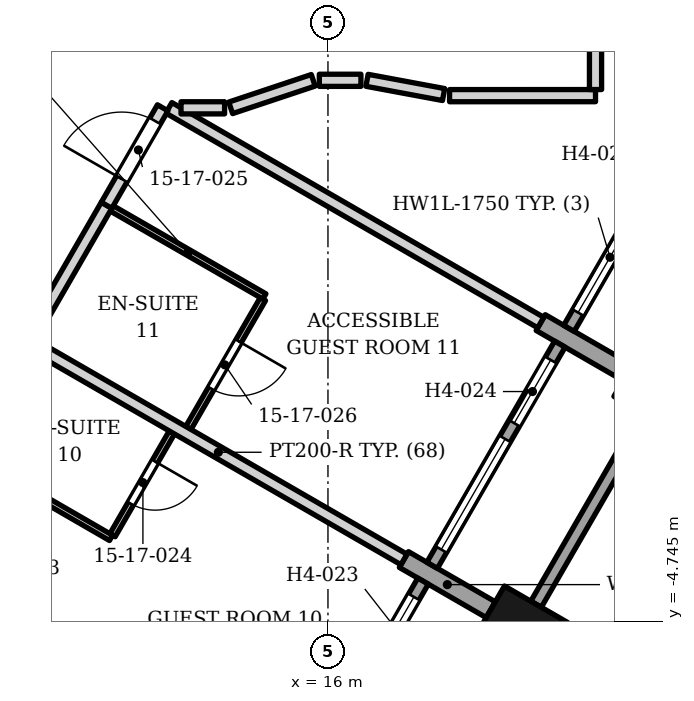
"""IFC4 building model, lengths in metres.
Left out: names, types, materials, properties, quantities, classifications, styles, units other than length and angle.
Written with IfcOpenShell. Run it as: python <this file> out.ifc"""

import sys

from ifc_helpers import new_model, si_unit, direction, frame, frame_2d, origin, origin_2d, place, context, subcontext, project, spatial, rectangle, extrude, element, fill, save


model = new_model("IFC4")
c1 = context("Model", 3, precision=1e-05, world=origin(), true_north=direction((0.0, 1.0)))
c2 = subcontext(c1, "Body", "Model", "MODEL_VIEW")
j1 = project(units=[si_unit("LENGTHUNIT", "METRE"), si_unit("PLANEANGLEUNIT", "RADIAN")], contexts=[c1])
p1 = place(None, origin())
s1 = spatial("IfcSite", under=j1, at=p1, CompositionType="ELEMENT")
p2 = place(p1, origin())
s2 = spatial("IfcBuilding", under=s1, at=p2, CompositionType="ELEMENT")
p3 = place(p2, frame((0.0, 0.0, 76.6)))
s3 = spatial("IfcBuildingStorey", under=s2, at=p3, CompositionType="ELEMENT", Elevation=76.6)
p4 = place(p3, frame((19.197, -4.854, 0.0), z_axis=(0.0, 0.0, 1.0), x_axis=(0.5, 0.866025403784, 0.0)))
e1 = element("IfcColumn", 1, at=p4, inside=s3, PredefinedType="COLUMN", context=c2, shape_type="SweptSolid", body=[
    extrude(rectangle(XDim=0.9, YDim=1.2, at=origin_2d()), origin(), (0.0, 0.0, 1.0), 3.4),
])
p5 = place(p3, frame((18.677, -4.554, 0.0), z_axis=(0.0, 0.0, 1.0), x_axis=(-0.865966208357, 0.500102515474, 0.0)))
e2 = element("IfcWall", 2, at=p5, inside=s3, PredefinedType="SOLIDWALL", context=c2, shape_type="SweptSolid", body=[
    extrude(rectangle(XDim=1.65, YDim=0.3, at=frame_2d((0.825, 0.0))), origin(), (0.0, 0.0, 1.0), 2.628),
])
p6 = place(p3, frame((20.928, -0.657, 0.0), z_axis=(0.0, 0.0, 1.0), x_axis=(0.865955154139, -0.50012165622, 0.0)))
e3 = element("IfcWall", 3, at=p6, inside=s3, PredefinedType="SOLIDWALL", context=c2, shape_type="SweptSolid", body=[
    extrude(rectangle(XDim=1.2, YDim=0.9, at=frame_2d((0.6, 0.0))), origin(), (0.0, 0.0, 1.0), 2.63),
])
p7 = place(p3, frame((19.499, 0.168, 0.0), z_axis=(0.0, 0.0, 1.0), x_axis=(0.866040211805, -0.499974350878, 0.0)))
e4 = element("IfcWall", 4, at=p7, inside=s3, PredefinedType="SOLIDWALL", context=c2, shape_type="SweptSolid", body=[
    extrude(rectangle(XDim=1.65, YDim=0.3, at=frame_2d((0.825, 0.0))), origin(), (0.0, 0.0, 1.0), 2.65),
])
p8 = place(p3, frame((15.464, -7.721, 0.0), z_axis=(0.0, 0.0, 1.0), x_axis=(0.500027713859, 0.866009402589, 0.0)))
e5 = element("IfcWall", 5, at=p8, inside=s3, PredefinedType="ELEMENTEDWALL", context=c2, shape_type="SweptSolid", body=[
    extrude(rectangle(XDim=4.2, YDim=0.2, at=frame_2d((2.1, 0.0))), origin(), (0.0, 0.0, 1.0), 2.384),
])
p9 = place(p8, frame((0.3, 0.0, 0.6)))
e6 = element("IfcOpeningElement", 6, at=p9, cuts=e5, PredefinedType="OPENING", context=c2, shape_type="SweptSolid", body=[
    extrude(rectangle(XDim=2.1, YDim=1.68, at=frame_2d((1.05, 0.84))), frame((0.0, 0.11, 0.0), z_axis=(0.0, -1.0, 0.0), x_axis=(1.0, 0.0, 0.0)), (0.0, 0.0, 1.0), 0.22),
])
p10 = place(p8, frame((2.7, 0.0, 0.0)))
e7 = element("IfcOpeningElement", 7, at=p10, cuts=e5, PredefinedType="OPENING", context=c2, shape_type="SweptSolid", body=[
    extrude(rectangle(XDim=1.2, YDim=2.28, at=frame_2d((0.6, 1.14))), frame((0.0, 0.11, 0.0), z_axis=(0.0, -1.0, 0.0), x_axis=(1.0, 0.0, 0.0)), (0.0, 0.0, 1.0), 0.22),
])
p11 = place(p3, frame((19.422, -4.464, 0.0), z_axis=(0.0, 0.0, 1.0), x_axis=(0.500012057535, 0.866018442252, 0.0)))
e8 = element("IfcWall", 8, at=p11, inside=s3, PredefinedType="SOLIDWALL", context=c2, shape_type="SweptSolid", body=[
    extrude(rectangle(XDim=3.6, YDim=0.2, at=frame_2d((1.8, 0.0))), origin(), (0.0, 0.0, 1.0), 2.63),
])
p12 = place(p3, frame((17.714, -3.824, 0.0), z_axis=(0.0, 0.0, 1.0), x_axis=(0.500027713859, 0.866009402589, 0.0)))
e9 = element("IfcWall", 9, at=p12, inside=s3, PredefinedType="ELEMENTEDWALL", context=c2, shape_type="SweptSolid", body=[
    extrude(rectangle(XDim=4.2, YDim=0.2, at=frame_2d((2.1, 0.0))), origin(), (0.0, 0.0, 1.0), 2.628),
])
p13 = place(p12, frame((0.3, 0.0, 0.6)))
e10 = element("IfcOpeningElement", 10, at=p13, cuts=e9, PredefinedType="OPENING", context=c2, shape_type="SweptSolid", body=[
    extrude(rectangle(XDim=2.1, YDim=1.8, at=frame_2d((1.05, 0.9))), frame((0.0, 0.11, 0.0), z_axis=(0.0, -1.0, 0.0), x_axis=(1.0, 0.0, 0.0)), (0.0, 0.0, 1.0), 0.22),
])
p14 = place(p12, frame((2.7, 0.0, 0.0)))
e11 = element("IfcOpeningElement", 11, at=p14, cuts=e9, PredefinedType="OPENING", context=c2, shape_type="SweptSolid", body=[
    extrude(rectangle(XDim=1.2, YDim=2.4, at=frame_2d((0.6, 1.2))), frame((0.0, 0.11, 0.0), z_axis=(0.0, -1.0, 0.0), x_axis=(1.0, 0.0, 0.0)), (0.0, 0.0, 1.0), 0.22),
])
p15 = place(p3, frame((19.964, 0.073, 0.0), z_axis=(0.0, 0.0, 1.0), x_axis=(0.500027713859, 0.866009402589, 0.0)))
e12 = element("IfcWall", 12, at=p15, inside=s3, PredefinedType="ELEMENTEDWALL", context=c2, shape_type="SweptSolid", body=[
    extrude(rectangle(XDim=4.2, YDim=0.2, at=frame_2d((2.1, 0.0))), origin(), (0.0, 0.0, 1.0), 2.45),
])
p16 = place(p15, frame((0.3, 0.0, 0.6)))
e13 = element("IfcOpeningElement", 13, at=p16, cuts=e12, PredefinedType="OPENING", context=c2, shape_type="SweptSolid", body=[
    extrude(rectangle(XDim=2.1, YDim=1.75, at=frame_2d((1.05, 0.875))), frame((0.0, 0.11, 0.0), z_axis=(0.0, -1.0, 0.0), x_axis=(1.0, 0.0, 0.0)), (0.0, 0.0, 1.0), 0.22),
])
p17 = place(p15, frame((2.7, 0.0, 0.0)))
e14 = element("IfcOpeningElement", 14, at=p17, cuts=e12, PredefinedType="OPENING", context=c2, shape_type="SweptSolid", body=[
    extrude(rectangle(XDim=1.2, YDim=2.35, at=frame_2d((0.6, 1.175))), frame((0.0, 0.11, 0.0), z_axis=(0.0, -1.0, 0.0), x_axis=(1.0, 0.0, 0.0)), (0.0, 0.0, 1.0), 0.22),
])
p18 = place(p3, frame((8.895, -4.1, 0.0), z_axis=(0.0, 0.0, 1.0), x_axis=(0.865906406618, -0.500206052519, 0.0)))
e15 = element("IfcWall", 15, at=p18, inside=s3, PredefinedType="PARTITIONING", context=c2, shape_type="SweptSolid", body=[
    extrude(rectangle(XDim=7.05, YDim=0.2, at=frame_2d((3.525, 0.0))), origin(), (0.0, 0.0, 1.0), 2.242),
])
p19 = place(p3, frame((12.457, -3.33, 0.0), z_axis=(0.0, 0.0, 1.0), x_axis=(0.49989585183, 0.866085525409, 0.0)))
e16 = element("IfcWall", 16, at=p19, inside=s3, PredefinedType="PARTITIONING", context=c2, shape_type="SweptSolid", body=[
    extrude(rectangle(XDim=1.95, YDim=0.1, at=frame_2d((0.975, 0.0))), origin(), (0.0, 0.0, 1.0), 2.242),
])
p20 = place(p19, frame((0.6, 0.0, 0.0)))
e17 = element("IfcOpeningElement", 17, at=p20, cuts=e16, PredefinedType="OPENING", context=c2, shape_type="SweptSolid", body=[
    extrude(rectangle(XDim=0.8, YDim=2.1, at=frame_2d((0.4, 1.05))), frame((0.0, 0.06, 0.0), z_axis=(0.0, -1.0, 0.0), x_axis=(1.0, 0.0, 0.0)), (0.0, 0.0, 1.0), 0.12),
])
p21 = place(p3, frame((10.094, -2.021, 0.0), z_axis=(0.0, 0.0, 1.0), x_axis=(0.86571095196, -0.500544251447, 0.0)))
e18 = element("IfcWall", 18, at=p21, inside=s3, PredefinedType="PARTITIONING", context=c2, shape_type="SweptSolid", body=[
    extrude(rectangle(XDim=2.7, YDim=0.1, at=frame_2d((1.35, 0.0))), origin(), (0.0, 0.0, 1.0), 2.242),
])
p22 = place(p3, frame((13.704, -1.566, 0.0), z_axis=(0.0, 0.0, 1.0), x_axis=(0.500607988505, 0.865674096785, 0.0)))
e19 = element("IfcWall", 19, at=p22, inside=s3, PredefinedType="PARTITIONING", context=c2, shape_type="SweptSolid", body=[
    extrude(rectangle(XDim=2.45, YDim=0.1, at=frame_2d((1.225, 0.0))), origin(), (0.0, 0.0, 1.0), 2.242),
])
p23 = place(p22, frame((0.75, 0.0, 0.0)))
e20 = element("IfcOpeningElement", 20, at=p23, cuts=e19, PredefinedType="OPENING", context=c2, shape_type="SweptSolid", body=[
    extrude(rectangle(XDim=0.9, YDim=2.1, at=frame_2d((0.45, 1.05))), frame((0.0, 0.06, 0.0), z_axis=(0.0, -1.0, 0.0), x_axis=(1.0, 0.0, 0.0)), (0.0, 0.0, 1.0), 0.12),
])
p24 = place(p3, frame((11.145, -0.202, 0.0), z_axis=(0.0, 0.0, 1.0), x_axis=(0.866031034943, -0.499990246421, 0.0)))
e21 = element("IfcWall", 21, at=p24, inside=s3, PredefinedType="PARTITIONING", context=c2, shape_type="SweptSolid", body=[
    extrude(rectangle(XDim=7.05, YDim=0.2, at=frame_2d((3.525, 0.0))), origin(), (0.0, 0.0, 1.0), 2.242),
])
p25 = place(p3, frame((13.383, 3.699, 0.0), z_axis=(0.0, 0.0, 1.0), x_axis=(0.866028421525, -0.499994773084, 0.0)))
e22 = element("IfcWall", 22, at=p25, inside=s3, PredefinedType="PARTITIONING", context=c2, shape_type="SweptSolid", body=[
    extrude(rectangle(XDim=7.062, YDim=0.2, at=frame_2d((3.531, 0.0))), origin(), (0.0, 0.0, 1.0), 2.242),
])
p26 = place(p3, frame((12.443, 2.046, 0.0), z_axis=(0.0, 0.0, 1.0), x_axis=(0.866329932158, -0.499472170042, 0.0)))
e23 = element("IfcWall", 23, at=p26, inside=s3, PredefinedType="PARTITIONING", context=c2, shape_type="SweptSolid", body=[
    extrude(rectangle(XDim=2.9, YDim=0.1, at=frame_2d((1.45, 0.0))), origin(), (0.0, 0.0, 1.0), 2.242),
])
p27 = place(p3, frame((0.859, -17.822, 0.0), z_axis=(0.0, 0.0, 1.0), x_axis=(0.500002395808, 0.866024020559, 0.0)))
e24 = element("IfcWall", 24, at=p27, inside=s3, PredefinedType="PARTITIONING", context=c2, shape_type="SweptSolid", body=[
    extrude(rectangle(XDim=23.0, YDim=0.2, at=frame_2d((11.5, 0.0))), origin(), (0.0, 0.0, 1.0), 2.242),
])
p28 = place(p27, frame((0.7, 0.0, 0.0)))
e25 = element("IfcOpeningElement", 25, at=p28, cuts=e24, PredefinedType="OPENING", context=c2, shape_type="SweptSolid", body=[
    extrude(rectangle(XDim=1.0, YDim=2.1, at=frame_2d((0.5, 1.05))), frame((0.0, 0.11, 0.0), z_axis=(0.0, -1.0, 0.0), x_axis=(1.0, 0.0, 0.0)), (0.0, 0.0, 1.0), 0.22),
])
p29 = place(p27, frame((3.1, 0.0, 0.0)))
e26 = element("IfcOpeningElement", 26, at=p29, cuts=e24, PredefinedType="OPENING", context=c2, shape_type="SweptSolid", body=[
    extrude(rectangle(XDim=1.0, YDim=2.1, at=frame_2d((0.5, 1.05))), frame((0.0, 0.11, 0.0), z_axis=(0.0, -1.0, 0.0), x_axis=(1.0, 0.0, 0.0)), (0.0, 0.0, 1.0), 0.22),
])
p30 = place(p27, frame((9.7, 0.0, 0.0)))
e27 = element("IfcOpeningElement", 27, at=p30, cuts=e24, PredefinedType="OPENING", context=c2, shape_type="SweptSolid", body=[
    extrude(rectangle(XDim=1.0, YDim=2.1, at=frame_2d((0.5, 1.05))), frame((0.0, 0.11, 0.0), z_axis=(0.0, -1.0, 0.0), x_axis=(1.0, 0.0, 0.0)), (0.0, 0.0, 1.0), 0.22),
])
p31 = place(p27, frame((12.1, 0.0, 0.0)))
e28 = element("IfcOpeningElement", 28, at=p31, cuts=e24, PredefinedType="OPENING", context=c2, shape_type="SweptSolid", body=[
    extrude(rectangle(XDim=1.0, YDim=2.1, at=frame_2d((0.5, 1.05))), frame((0.0, 0.11, 0.0), z_axis=(0.0, -1.0, 0.0), x_axis=(1.0, 0.0, 0.0)), (0.0, 0.0, 1.0), 0.22),
])
p32 = place(p27, frame((16.6, 0.0, 0.0)))
e29 = element("IfcOpeningElement", 29, at=p32, cuts=e24, PredefinedType="OPENING", context=c2, shape_type="SweptSolid", body=[
    extrude(rectangle(XDim=1.0, YDim=2.1, at=frame_2d((0.5, 1.05))), frame((0.0, 0.11, 0.0), z_axis=(0.0, -1.0, 0.0), x_axis=(1.0, 0.0, 0.0)), (0.0, 0.0, 1.0), 0.22),
])
p33 = place(p3, frame((12.359, 2.097, 0.0), z_axis=(0.0, 0.0, 1.0), x_axis=(0.499120619587, 0.866532519357, 0.0)))
e30 = element("IfcWall", 30, at=p33, inside=s3, PredefinedType="PARTITIONING", context=c2, shape_type="SweptSolid", body=[
    extrude(rectangle(XDim=1.85, YDim=0.2, at=frame_2d((0.925, 0.0))), origin(), (0.0, 0.0, 1.0), 2.242),
])
p34 = place(p33, frame((0.5, 0.0, 0.0)))
e31 = element("IfcOpeningElement", 31, at=p34, cuts=e30, PredefinedType="OPENING", context=c2, shape_type="SweptSolid", body=[
    extrude(rectangle(XDim=1.1, YDim=2.1, at=frame_2d((0.55, 1.05))), frame((0.0, 0.11, 0.0), z_axis=(0.0, -1.0, 0.0), x_axis=(1.0, 0.0, 0.0)), (0.0, 0.0, 1.0), 0.22),
])
p35 = place(p3, frame((13.583, 3.699, 0.0), z_axis=(0.0, 0.0, 1.0), x_axis=(1.0, 0.0, 0.0)))
e32 = element("IfcWall", 32, at=p35, inside=s3, PredefinedType="PARTITIONING", context=c2, shape_type="SweptSolid", body=[
    extrude(rectangle(XDim=0.717, YDim=0.2, at=frame_2d((0.358, 0.0))), origin(), (0.0, 0.0, 1.0), 2.242),
])
p36 = place(p3, frame((14.4, 3.699, 0.0), z_axis=(0.0, 0.0, 1.0), x_axis=(0.948666237396, 0.316278943379, 0.0)))
e33 = element("IfcWall", 33, at=p36, inside=s3, PredefinedType="PARTITIONING", context=c2, shape_type="SweptSolid", body=[
    extrude(rectangle(XDim=1.431, YDim=0.2, at=frame_2d((0.716, 0.0))), origin(), (0.0, 0.0, 1.0), 2.384),
])
p37 = place(p3, frame((18.0, 3.899, 0.0), z_axis=(0.0, 0.0, 1.0), x_axis=(0.999999979311, 0.000203417408, 0.0)))
e34 = element("IfcWall", 34, at=p37, inside=s3, PredefinedType="PARTITIONING", context=c2, shape_type="SweptSolid", body=[
    extrude(rectangle(XDim=2.4, YDim=0.2, at=frame_2d((1.2, 0.0))), origin(), (0.0, 0.0, 1.0), 3.23),
])
p38 = place(p3, frame((20.4, 4.0, 0.0), z_axis=(0.0, 0.0, 1.0), x_axis=(0.0, 1.0, 0.0)))
e35 = element("IfcWall", 35, at=p38, inside=s3, PredefinedType="PARTITIONING", context=c2, shape_type="SweptSolid", body=[
    extrude(rectangle(XDim=2.253, YDim=0.2, at=frame_2d((1.126, 0.0))), origin(), (0.0, 0.0, 1.0), 3.23),
])
p39 = place(p3, frame((15.858, 4.152, 0.0), z_axis=(0.0, 0.0, 1.0), x_axis=(1.0, 0.0, 0.0)))
e36 = element("IfcWall", 36, at=p39, inside=s3, PredefinedType="PARTITIONING", context=c2, shape_type="SweptSolid", body=[
    extrude(rectangle(XDim=0.684, YDim=0.2, at=frame_2d((0.342, 0.0))), origin(), (0.0, 0.0, 1.0), 2.384),
])
p40 = place(p3, frame((16.642, 4.152, 0.0), z_axis=(0.0, 0.0, 1.0), x_axis=(0.983117293899, -0.182976464161, 0.0)))
e37 = element("IfcWall", 37, at=p40, inside=s3, PredefinedType="PARTITIONING", context=c2, shape_type="SweptSolid", body=[
    extrude(rectangle(XDim=1.281, YDim=0.2, at=frame_2d((0.641, 0.0))), origin(), (0.0, 0.0, 1.0), 2.628),
])
p41 = place(p10, origin())
e38 = element("IfcDoor", 38, at=p41, inside=s3, OperationType="SINGLE_SWING_LEFT", PredefinedType="DOOR", context=c2, shape_type="SweptSolid", body=[
    extrude(rectangle(XDim=1.2, YDim=2.28, at=frame_2d((0.6, 1.14))), frame((0.0, 0.025, 0.0), z_axis=(0.0, -1.0, 0.0), x_axis=(1.0, 0.0, 0.0)), (0.0, 0.0, 1.0), 0.05),
])
fill(e7, e38)
p42 = place(p13, origin())
e39 = element("IfcWindow", 39, at=p42, inside=s3, PartitioningType="SINGLE_PANEL", PredefinedType="WINDOW", context=c2, shape_type="SweptSolid", body=[
    extrude(rectangle(XDim=2.1, YDim=1.8, at=frame_2d((1.05, 0.9))), frame((0.0, 0.03, 0.0), z_axis=(0.0, -1.0, 0.0), x_axis=(1.0, 0.0, 0.0)), (0.0, 0.0, 1.0), 0.06),
])
fill(e10, e39)
p43 = place(p14, origin())
e40 = element("IfcDoor", 40, at=p43, inside=s3, OperationType="SINGLE_SWING_LEFT", PredefinedType="DOOR", context=c2, shape_type="SweptSolid", body=[
    extrude(rectangle(XDim=1.2, YDim=2.4, at=frame_2d((0.6, 1.2))), frame((0.0, 0.025, 0.0), z_axis=(0.0, -1.0, 0.0), x_axis=(1.0, 0.0, 0.0)), (0.0, 0.0, 1.0), 0.05),
])
fill(e11, e40)
p44 = place(p16, origin())
e41 = element("IfcWindow", 41, at=p44, inside=s3, PartitioningType="SINGLE_PANEL", PredefinedType="WINDOW", context=c2, shape_type="SweptSolid", body=[
    extrude(rectangle(XDim=2.1, YDim=1.75, at=frame_2d((1.05, 0.875))), frame((0.0, 0.03, 0.0), z_axis=(0.0, -1.0, 0.0), x_axis=(1.0, 0.0, 0.0)), (0.0, 0.0, 1.0), 0.06),
])
fill(e13, e41)
p45 = place(p20, origin())
e42 = element("IfcDoor", 42, at=p45, inside=s3, OperationType="SINGLE_SWING_RIGHT", PredefinedType="DOOR", context=c2, shape_type="SweptSolid", body=[
    extrude(rectangle(XDim=0.8, YDim=2.1, at=frame_2d((0.4, 1.05))), frame((0.0, 0.025, 0.0), z_axis=(0.0, -1.0, 0.0), x_axis=(1.0, 0.0, 0.0)), (0.0, 0.0, 1.0), 0.05),
])
fill(e17, e42)
p46 = place(p34, origin())
e43 = element("IfcDoor", 43, at=p46, inside=s3, OperationType="SINGLE_SWING_LEFT", PredefinedType="DOOR", context=c2, shape_type="SweptSolid", body=[
    extrude(rectangle(XDim=1.1, YDim=2.1, at=frame_2d((0.55, 1.05))), frame((0.0, 0.025, 0.0), z_axis=(0.0, -1.0, 0.0), x_axis=(1.0, 0.0, 0.0)), (0.0, 0.0, 1.0), 0.05),
])
fill(e31, e43)
p47 = place(p23, origin())
e44 = element("IfcDoor", 44, at=p47, inside=s3, OperationType="SINGLE_SWING_RIGHT", PredefinedType="DOOR", context=c2, shape_type="SweptSolid", body=[
    extrude(rectangle(XDim=0.9, YDim=2.1, at=frame_2d((0.45, 1.05))), frame((0.0, 0.025, 0.0), z_axis=(0.0, -1.0, 0.0), x_axis=(1.0, 0.0, 0.0)), (0.0, 0.0, 1.0), 0.05),
])
fill(e20, e44)
save(model, sys.argv[1])
